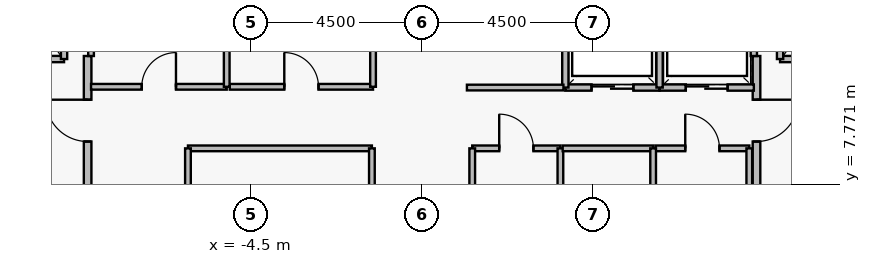
"""IFC4 building model, lengths in metres.
Left out: names, types, materials, properties, quantities, classifications, styles, units other than length and angle.
Written with IfcOpenShell. Run it as: python <this file> out.ifc"""

import sys

from ifc_helpers import new_model, si_unit, direction, frame, frame_2d, origin, place, context, subcontext, project, spatial, rectangle, extrude, element, fill, save


model = new_model("IFC4")
c1 = context("Model", 3, precision=1e-05, world=origin(), true_north=direction((0.0, 1.0)))
c2 = subcontext(c1, "Body", "Model", "MODEL_VIEW")
j1 = project(units=[si_unit("LENGTHUNIT", "METRE"), si_unit("PLANEANGLEUNIT", "RADIAN")], contexts=[c1])
p1 = place(None, origin())
s1 = spatial("IfcSite", under=j1, at=p1, CompositionType="ELEMENT")
p2 = place(p1, origin())
s2 = spatial("IfcBuilding", under=s1, at=p2, CompositionType="ELEMENT")
p3 = place(p2, frame((0.0, 0.0, 254.45)))
s3 = spatial("IfcBuildingStorey", under=s2, at=p3, CompositionType="ELEMENT", Elevation=254.45)
p4 = place(p3, frame((-8.8, 5.05, 0.0), z_axis=(0.0, 0.0, 1.0), x_axis=(0.0, 1.0, 0.0)))
e1 = element("IfcWall", 1, at=p4, inside=s3, PredefinedType="PARTITIONING", context=c2, shape_type="SweptSolid", body=[
    extrude(rectangle(XDim=6.1, YDim=0.2, at=frame_2d((3.05, 0.0))), origin(), (0.0, 0.0, 1.0), 3.48),
])
p5 = place(p4, frame((0.25, 0.0, 0.0)))
e2 = element("IfcOpeningElement", 2, at=p5, cuts=e1, PredefinedType="OPENING", context=c2, shape_type="SweptSolid", body=[
    extrude(rectangle(XDim=1.1, YDim=2.2, at=frame_2d((0.55, 1.1))), frame((0.0, 0.11, 0.0), z_axis=(0.0, -1.0, 0.0), x_axis=(1.0, 0.0, 0.0)), (0.0, 0.0, 1.0), 0.22),
])
p6 = place(p4, frame((3.85, 0.0, 0.0)))
e3 = element("IfcOpeningElement", 3, at=p6, cuts=e1, PredefinedType="OPENING", context=c2, shape_type="SweptSolid", body=[
    extrude(rectangle(XDim=1.1, YDim=2.2, at=frame_2d((0.55, 1.1))), frame((0.0, 0.11, 0.0), z_axis=(0.0, -1.0, 0.0), x_axis=(1.0, 0.0, 0.0)), (0.0, 0.0, 1.0), 0.22),
])
p7 = place(p3, frame((8.8, 11.15, 0.0), z_axis=(0.0, 0.0, 1.0), x_axis=(0.0, -1.0, 0.0)))
e4 = element("IfcWall", 4, at=p7, inside=s3, PredefinedType="PARTITIONING", context=c2, shape_type="SweptSolid", body=[
    extrude(rectangle(XDim=6.1, YDim=0.2, at=frame_2d((3.05, 0.0))), origin(), (0.0, 0.0, 1.0), 3.48),
])
p8 = place(p7, frame((1.15, 0.0, 0.0)))
e5 = element("IfcOpeningElement", 5, at=p8, cuts=e4, PredefinedType="OPENING", context=c2, shape_type="SweptSolid", body=[
    extrude(rectangle(XDim=1.1, YDim=2.2, at=frame_2d((0.55, 1.1))), frame((0.0, 0.11, 0.0), z_axis=(0.0, -1.0, 0.0), x_axis=(1.0, 0.0, 0.0)), (0.0, 0.0, 1.0), 0.22),
])
p9 = place(p7, frame((4.75, 0.0, 0.0)))
e6 = element("IfcOpeningElement", 6, at=p9, cuts=e4, PredefinedType="OPENING", context=c2, shape_type="SweptSolid", body=[
    extrude(rectangle(XDim=1.1, YDim=2.2, at=frame_2d((0.55, 1.1))), frame((0.0, 0.11, 0.0), z_axis=(0.0, -1.0, 0.0), x_axis=(1.0, 0.0, 0.0)), (0.0, 0.0, 1.0), 0.22),
])
p10 = place(p3, frame((-11.58, 11.07, 0.0), z_axis=(0.0, 0.0, 1.0), x_axis=(1.0, 0.0, 0.0)))
e7 = element("IfcWall", 7, at=p10, inside=s3, PredefinedType="PARTITIONING", context=c2, shape_type="SweptSolid", body=[
    extrude(rectangle(XDim=2.16, YDim=0.165, at=frame_2d((1.08, 0.0))), origin(), (0.0, 0.0, 1.0), 3.48),
])
p11 = place(p10, frame((0.53, 0.0, 0.0)))
e8 = element("IfcOpeningElement", 8, at=p11, cuts=e7, PredefinedType="OPENING", context=c2, shape_type="SweptSolid", body=[
    extrude(rectangle(XDim=1.15, YDim=2.25, at=frame_2d((0.575, 1.125))), frame((0.0, 0.093, 0.0), z_axis=(0.0, -1.0, 0.0), x_axis=(1.0, 0.0, 0.0)), (0.0, 0.0, 1.0), 0.185),
])
p12 = place(p3, frame((9.42, 11.07, 0.0), z_axis=(0.0, 0.0, 1.0), x_axis=(1.0, 0.0, 0.0)))
e9 = element("IfcWall", 9, at=p12, inside=s3, PredefinedType="PARTITIONING", context=c2, shape_type="SweptSolid", body=[
    extrude(rectangle(XDim=2.16, YDim=0.165, at=frame_2d((1.08, 0.0))), origin(), (0.0, 0.0, 1.0), 3.48),
])
p13 = place(p12, frame((0.53, 0.0, 0.0)))
e10 = element("IfcOpeningElement", 10, at=p13, cuts=e9, PredefinedType="OPENING", context=c2, shape_type="SweptSolid", body=[
    extrude(rectangle(XDim=1.15, YDim=2.25, at=frame_2d((0.575, 1.125))), frame((0.0, 0.093, 0.0), z_axis=(0.0, -1.0, 0.0), x_axis=(1.0, 0.0, 0.0)), (0.0, 0.0, 1.0), 0.185),
])
p14 = place(p3, frame((3.77, 10.32, 0.0), z_axis=(0.0, 0.0, 1.0), x_axis=(1.0, 0.0, 0.0)))
e11 = element("IfcWall", 11, at=p14, inside=s3, PredefinedType="PARTITIONING", context=c2, shape_type="SweptSolid", body=[
    extrude(rectangle(XDim=2.48, YDim=0.165, at=frame_2d((1.24, 0.0))), origin(), (0.0, 0.0, 1.0), 3.48),
])
p15 = place(p14, frame((0.69, 0.0, 0.0)))
e12 = element("IfcOpeningElement", 12, at=p15, cuts=e11, PredefinedType="OPENING", context=c2, shape_type="SweptSolid", body=[
    extrude(rectangle(XDim=1.1, YDim=2.25, at=frame_2d((0.55, 1.125))), frame((0.0, 0.093, 0.0), z_axis=(0.0, -1.0, 0.0), x_axis=(1.0, 0.0, 0.0)), (0.0, 0.0, 1.0), 0.185),
])
p16 = place(p3, frame((6.25, 10.32, 0.0), z_axis=(0.0, 0.0, 1.0), x_axis=(1.0, 0.0, 0.0)))
e13 = element("IfcWall", 13, at=p16, inside=s3, PredefinedType="PARTITIONING", context=c2, shape_type="SweptSolid", body=[
    extrude(rectangle(XDim=2.48, YDim=0.165, at=frame_2d((1.24, 0.0))), origin(), (0.0, 0.0, 1.0), 3.48),
])
p17 = place(p16, frame((0.69, 0.0, 0.0)))
e14 = element("IfcOpeningElement", 14, at=p17, cuts=e13, PredefinedType="OPENING", context=c2, shape_type="SweptSolid", body=[
    extrude(rectangle(XDim=1.1, YDim=2.25, at=frame_2d((0.55, 1.125))), frame((0.0, 0.093, 0.0), z_axis=(0.0, -1.0, 0.0), x_axis=(1.0, 0.0, 0.0)), (0.0, 0.0, 1.0), 0.185),
])
p18 = place(p3, frame((-8.71, 10.34, 0.0), z_axis=(0.0, 0.0, 1.0), x_axis=(1.0, 0.0, 0.0)))
e15 = element("IfcWall", 15, at=p18, inside=s3, PredefinedType="PARTITIONING", context=c2, shape_type="SweptSolid", body=[
    extrude(rectangle(XDim=3.57, YDim=0.15, at=frame_2d((1.785, 0.0))), origin(), (0.0, 0.0, 1.0), 3.48),
])
p19 = place(p18, frame((1.335, 0.0, 0.0)))
e16 = element("IfcOpeningElement", 16, at=p19, cuts=e15, PredefinedType="OPENING", context=c2, shape_type="SweptSolid", body=[
    extrude(rectangle(XDim=0.9, YDim=2.15, at=frame_2d((0.45, 1.075))), frame((0.0, 0.085, 0.0), z_axis=(0.0, -1.0, 0.0), x_axis=(1.0, 0.0, 0.0)), (0.0, 0.0, 1.0), 0.17),
])
p20 = place(p3, frame((-5.06, 10.34, 0.0), z_axis=(0.0, 0.0, 1.0), x_axis=(1.0, 0.0, 0.0)))
e17 = element("IfcWall", 17, at=p20, inside=s3, PredefinedType="PARTITIONING", context=c2, shape_type="SweptSolid", body=[
    extrude(rectangle(XDim=3.77, YDim=0.15, at=frame_2d((1.885, 0.0))), origin(), (0.0, 0.0, 1.0), 3.48),
])
p21 = place(p20, frame((1.435, 0.0, 0.0)))
e18 = element("IfcOpeningElement", 18, at=p21, cuts=e17, PredefinedType="OPENING", context=c2, shape_type="SweptSolid", body=[
    extrude(rectangle(XDim=0.9, YDim=2.15, at=frame_2d((0.45, 1.075))), frame((0.0, 0.085, 0.0), z_axis=(0.0, -1.0, 0.0), x_axis=(1.0, 0.0, 0.0)), (0.0, 0.0, 1.0), 0.17),
])
p22 = place(p3, frame((1.32, 8.72, 0.0), z_axis=(0.0, 0.0, 1.0), x_axis=(1.0, 0.0, 0.0)))
e19 = element("IfcWall", 19, at=p22, inside=s3, PredefinedType="PARTITIONING", context=c2, shape_type="SweptSolid", body=[
    extrude(rectangle(XDim=2.32, YDim=0.15, at=frame_2d((1.16, 0.0))), origin(), (0.0, 0.0, 1.0), 3.48),
])
p23 = place(p22, frame((0.71, 0.0, 0.0)))
e20 = element("IfcOpeningElement", 20, at=p23, cuts=e19, PredefinedType="OPENING", context=c2, shape_type="SweptSolid", body=[
    extrude(rectangle(XDim=0.9, YDim=2.15, at=frame_2d((0.45, 1.075))), frame((0.0, 0.085, 0.0), z_axis=(0.0, -1.0, 0.0), x_axis=(1.0, 0.0, 0.0)), (0.0, 0.0, 1.0), 0.17),
])
p24 = place(p3, frame((6.14, 8.72, 0.0), z_axis=(0.0, 0.0, 1.0), x_axis=(1.0, 0.0, 0.0)))
e21 = element("IfcWall", 21, at=p24, inside=s3, PredefinedType="PARTITIONING", context=c2, shape_type="SweptSolid", body=[
    extrude(rectangle(XDim=2.47, YDim=0.15, at=frame_2d((1.235, 0.0))), origin(), (0.0, 0.0, 1.0), 3.48),
])
p25 = place(p24, frame((0.785, 0.0, 0.0)))
e22 = element("IfcOpeningElement", 22, at=p25, cuts=e21, PredefinedType="OPENING", context=c2, shape_type="SweptSolid", body=[
    extrude(rectangle(XDim=0.9, YDim=2.15, at=frame_2d((0.45, 1.075))), frame((0.0, 0.085, 0.0), z_axis=(0.0, -1.0, 0.0), x_axis=(1.0, 0.0, 0.0)), (0.0, 0.0, 1.0), 0.17),
])
for number, where, z_axis, x_axis in (
    (23, (-9.42, 11.07, 0.0), (0.0, 0.0, 1.0), (0.0, 1.0, 0.0)),
    (24, (9.42, 11.07, 0.0), (0.0, 0.0, 1.0), (0.0, 1.0, 0.0)),
):
    element("IfcWall", number, at=place(p3, frame(where, z_axis=z_axis, x_axis=x_axis)), inside=s3, PredefinedType="PARTITIONING", context=c2, shape_type="SweptSolid", body=[
        extrude(rectangle(XDim=2.96, YDim=0.165, at=frame_2d((1.48, 0.0))), origin(), (0.0, 0.0, 1.0), 3.48),
    ])
for number, where, z_axis, x_axis in (
    (25, (3.77, 10.32, 0.0), (0.0, 0.0, 1.0), (0.0, 1.0, 0.0)),
    (26, (6.25, 10.32, 0.0), (0.0, 0.0, 1.0), (0.0, 1.0, 0.0)),
):
    element("IfcWall", number, at=place(p3, frame(where, z_axis=z_axis, x_axis=x_axis)), inside=s3, PredefinedType="PARTITIONING", context=c2, shape_type="SweptSolid", body=[
        extrude(rectangle(XDim=2.36, YDim=0.165, at=frame_2d((1.18, 0.0))), origin(), (0.0, 0.0, 1.0), 3.48),
    ])
p26 = place(p3, frame((8.73, 11.15, 0.0), z_axis=(0.0, 0.0, 1.0), x_axis=(0.0, 1.0, 0.0)))
e27 = element("IfcWall", 27, at=p26, inside=s3, PredefinedType="PARTITIONING", context=c2, shape_type="SweptSolid", body=[
    extrude(rectangle(XDim=1.53, YDim=0.165, at=frame_2d((0.765, 0.0))), origin(), (0.0, 0.0, 1.0), 3.48),
])
p27 = place(p3, frame((-8.71, 11.15, 0.0), z_axis=(0.0, 0.0, 1.0), x_axis=(0.0, 1.0, 0.0)))
e28 = element("IfcWall", 28, at=p27, inside=s3, PredefinedType="PARTITIONING", context=c2, shape_type="SweptSolid", body=[
    extrude(rectangle(XDim=1.71, YDim=0.15, at=frame_2d((0.855, 0.0))), origin(), (0.0, 0.0, 1.0), 3.48),
])
for number, where, z_axis, x_axis in (
    (29, (-5.14, 10.34, 0.0), (0.0, 0.0, 1.0), (0.0, 1.0, 0.0)),
    (30, (-1.29, 10.34, 0.0), (0.0, 0.0, 1.0), (0.0, 1.0, 0.0)),
):
    element("IfcWall", number, at=place(p3, frame(where, z_axis=z_axis, x_axis=x_axis)), inside=s3, PredefinedType="PARTITIONING", context=c2, shape_type="SweptSolid", body=[
        extrude(rectangle(XDim=2.52, YDim=0.15, at=frame_2d((1.26, 0.0))), origin(), (0.0, 0.0, 1.0), 3.48),
    ])
p28 = place(p3, frame((-6.16, 8.72, 0.0), z_axis=(0.0, 0.0, 1.0), x_axis=(1.0, 0.0, 0.0)))
e31 = element("IfcWall", 31, at=p28, inside=s3, PredefinedType="PARTITIONING", context=c2, shape_type="SweptSolid", body=[
    extrude(rectangle(XDim=4.84, YDim=0.15, at=frame_2d((2.42, 0.0))), origin(), (0.0, 0.0, 1.0), 3.48),
])
for number, where, z_axis, x_axis in (
    (32, (-6.16, 6.48, 0.0), (0.0, 0.0, 1.0), (0.0, 1.0, 0.0)),
    (33, (-1.32, 6.48, 0.0), (0.0, 0.0, 1.0), (0.0, 1.0, 0.0)),
    (34, (1.32, 6.48, 0.0), (0.0, 0.0, 1.0), (0.0, 1.0, 0.0)),
    (35, (3.64, 6.48, 0.0), (0.0, 0.0, 1.0), (0.0, 1.0, 0.0)),
):
    element("IfcWall", number, at=place(p3, frame(where, z_axis=z_axis, x_axis=x_axis)), inside=s3, PredefinedType="PARTITIONING", context=c2, shape_type="SweptSolid", body=[
        extrude(rectangle(XDim=2.24, YDim=0.15, at=frame_2d((1.12, 0.0))), origin(), (0.0, 0.0, 1.0), 3.48),
    ])
p29 = place(p3, frame((3.7, 8.72, 0.0), z_axis=(0.0, 0.0, 1.0), x_axis=(1.0, 0.0, 0.0)))
e36 = element("IfcWall", 36, at=p29, inside=s3, PredefinedType="PARTITIONING", context=c2, shape_type="SweptSolid", body=[
    extrude(rectangle(XDim=2.38, YDim=0.15, at=frame_2d((1.19, 0.0))), origin(), (0.0, 0.0, 1.0), 3.48),
])
for number, where, z_axis, x_axis in (
    (37, (6.08, 6.48, 0.0), (0.0, 0.0, 1.0), (0.0, 1.0, 0.0)),
    (38, (8.61, 6.48, 0.0), (0.0, 0.0, 1.0), (0.0, 1.0, 0.0)),
):
    element("IfcWall", number, at=place(p3, frame(where, z_axis=z_axis, x_axis=x_axis)), inside=s3, PredefinedType="PARTITIONING", context=c2, shape_type="SweptSolid", body=[
        extrude(rectangle(XDim=2.24, YDim=0.15, at=frame_2d((1.12, 0.0))), origin(), (0.0, 0.0, 1.0), 3.48),
    ])
p30 = place(p3, frame((1.18, 10.32, 0.0), z_axis=(0.0, 0.0, 1.0), x_axis=(1.0, 0.0, 0.0)))
e39 = element("IfcWall", 39, at=p30, inside=s3, PredefinedType="PARTITIONING", context=c2, shape_type="SweptSolid", body=[
    extrude(rectangle(XDim=2.54, YDim=0.15, at=frame_2d((1.27, 0.0))), origin(), (0.0, 0.0, 1.0), 3.48),
])
p31 = place(p6, origin())
e40 = element("IfcDoor", 40, at=p31, inside=s3, OperationType="SINGLE_SWING_RIGHT", PredefinedType="DOOR", context=c2, shape_type="SweptSolid", body=[
    extrude(rectangle(XDim=1.1, YDim=2.2, at=frame_2d((0.55, 1.1))), frame((0.0, 0.025, 0.0), z_axis=(0.0, -1.0, 0.0), x_axis=(1.0, 0.0, 0.0)), (0.0, 0.0, 1.0), 0.05),
])
fill(e3, e40)
p32 = place(p8, origin())
e41 = element("IfcDoor", 41, at=p32, inside=s3, OperationType="SINGLE_SWING_LEFT", PredefinedType="DOOR", context=c2, shape_type="SweptSolid", body=[
    extrude(rectangle(XDim=1.1, YDim=2.2, at=frame_2d((0.55, 1.1))), frame((0.0, 0.025, 0.0), z_axis=(0.0, -1.0, 0.0), x_axis=(1.0, 0.0, 0.0)), (0.0, 0.0, 1.0), 0.05),
])
fill(e5, e41)
p33 = place(p15, origin())
e42 = element("IfcDoor", 42, at=p33, inside=s3, OperationType="SLIDING_TO_LEFT", PredefinedType="DOOR", context=c2, shape_type="SweptSolid", body=[
    extrude(rectangle(XDim=1.1, YDim=2.25, at=frame_2d((0.55, 1.125))), frame((0.0, 0.025, 0.0), z_axis=(0.0, -1.0, 0.0), x_axis=(1.0, 0.0, 0.0)), (0.0, 0.0, 1.0), 0.05),
])
fill(e12, e42)
p34 = place(p17, origin())
e43 = element("IfcDoor", 43, at=p34, inside=s3, OperationType="SLIDING_TO_LEFT", PredefinedType="DOOR", context=c2, shape_type="SweptSolid", body=[
    extrude(rectangle(XDim=1.1, YDim=2.25, at=frame_2d((0.55, 1.125))), frame((0.0, 0.025, 0.0), z_axis=(0.0, -1.0, 0.0), x_axis=(1.0, 0.0, 0.0)), (0.0, 0.0, 1.0), 0.05),
])
fill(e14, e43)
p35 = place(p19, origin())
e44 = element("IfcDoor", 44, at=p35, inside=s3, OperationType="SINGLE_SWING_RIGHT", PredefinedType="DOOR", context=c2, shape_type="SweptSolid", body=[
    extrude(rectangle(XDim=0.9, YDim=2.15, at=frame_2d((0.45, 1.075))), frame((0.0, 0.025, 0.0), z_axis=(0.0, -1.0, 0.0), x_axis=(1.0, 0.0, 0.0)), (0.0, 0.0, 1.0), 0.05),
])
fill(e16, e44)
p36 = place(p21, origin())
e45 = element("IfcDoor", 45, at=p36, inside=s3, OperationType="SINGLE_SWING_LEFT", PredefinedType="DOOR", context=c2, shape_type="SweptSolid", body=[
    extrude(rectangle(XDim=0.9, YDim=2.15, at=frame_2d((0.45, 1.075))), frame((0.0, 0.025, 0.0), z_axis=(0.0, -1.0, 0.0), x_axis=(1.0, 0.0, 0.0)), (0.0, 0.0, 1.0), 0.05),
])
fill(e18, e45)
p37 = place(p23, origin())
e46 = element("IfcDoor", 46, at=p37, inside=s3, OperationType="SINGLE_SWING_LEFT", PredefinedType="DOOR", context=c2, shape_type="SweptSolid", body=[
    extrude(rectangle(XDim=0.9, YDim=2.15, at=frame_2d((0.45, 1.075))), frame((0.0, 0.025, 0.0), z_axis=(0.0, -1.0, 0.0), x_axis=(1.0, 0.0, 0.0)), (0.0, 0.0, 1.0), 0.05),
])
fill(e20, e46)
p38 = place(p25, origin())
e47 = element("IfcDoor", 47, at=p38, inside=s3, OperationType="SINGLE_SWING_LEFT", PredefinedType="DOOR", context=c2, shape_type="SweptSolid", body=[
    extrude(rectangle(XDim=0.9, YDim=2.15, at=frame_2d((0.45, 1.075))), frame((0.0, 0.025, 0.0), z_axis=(0.0, -1.0, 0.0), x_axis=(1.0, 0.0, 0.0)), (0.0, 0.0, 1.0), 0.05),
])
fill(e22, e47)
save(model, sys.argv[1])
